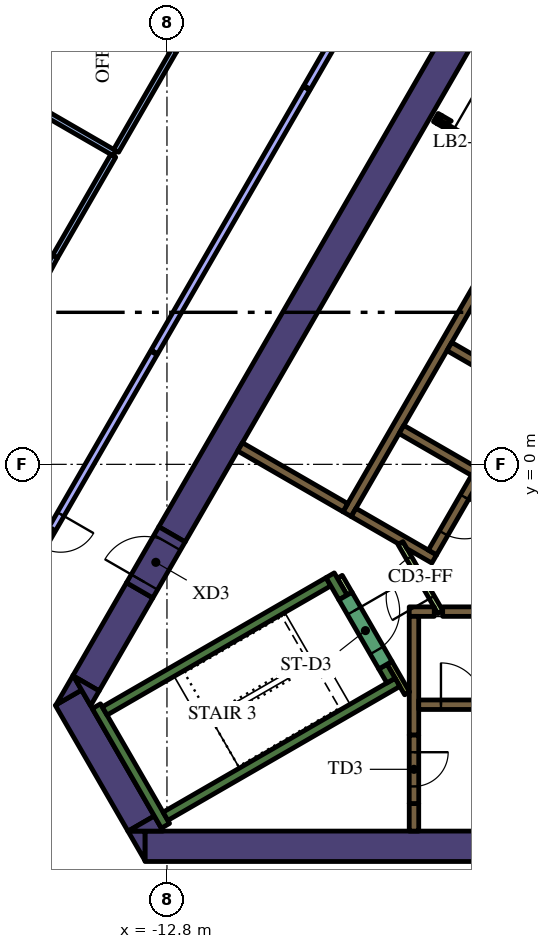
"""IFC4 building model, lengths in metres.
Left out: names, types, materials, properties, quantities, classifications, styles, units other than length and angle.
Written with IfcOpenShell. Run it as: python <this file> out.ifc"""

import sys

from ifc_helpers import new_model, si_unit, direction, frame, frame_2d, origin, place, context, subcontext, project, spatial, polyline, rectangle, outline, extrude, element, fill, save


model = new_model("IFC4")
c1 = context("Model", 3, precision=1e-05, world=origin(), true_north=direction((0.0, 1.0)))
c2 = subcontext(c1, "Body", "Model", "MODEL_VIEW")
j1 = project(units=[si_unit("LENGTHUNIT", "METRE"), si_unit("PLANEANGLEUNIT", "RADIAN")], contexts=[c1])
p1 = place(None, origin())
s1 = spatial("IfcSite", under=j1, at=p1, CompositionType="ELEMENT")
p2 = place(p1, origin())
s2 = spatial("IfcBuilding", under=s1, at=p2, CompositionType="ELEMENT")
p3 = place(p2, frame((0.0, 0.0, 175.2)))
s3 = spatial("IfcBuildingStorey", under=s2, at=p3, CompositionType="ELEMENT", Elevation=175.2)
p4 = place(p3, frame((-13.378, -10.05, 0.0), z_axis=(0.0, 0.0, 1.0), x_axis=(1.0, 0.0, 0.0)))
e1 = element("IfcWall", 1, at=p4, inside=s3, PredefinedType="SOLIDWALL", context=c2, shape_type="SweptSolid", body=[
    extrude(rectangle(XDim=22.282, YDim=0.8, at=frame_2d((11.141, 0.0))), origin(), (0.0, 0.0, 1.0), 4.2),
])
p5 = place(p3, origin())
e2 = element("IfcWall", 2, at=p5, inside=s3, PredefinedType="SOLIDWALL", context=c2, shape_type="SweptSolid", body=[
    extrude(outline(polyline([(-13.828, -9.65), (-13.38, -9.65), (-13.38, -10.426), (-13.828, -9.65)])), origin(), (0.0, 0.0, 1.0), 4.2),
])
p6 = place(p3, frame((-15.392, -6.14, 0.0), z_axis=(0.0, 0.0, 1.0), x_axis=(0.499984020225, -0.866034629516, 0.0)))
e3 = element("IfcWall", 3, at=p6, inside=s3, PredefinedType="SOLIDWALL", context=c2, shape_type="SweptSolid", body=[
    extrude(rectangle(XDim=3.824, YDim=0.8, at=frame_2d((1.912, 0.0))), origin(), (0.0, 0.0, 1.0), 4.2),
])
e4 = element("IfcWall", 4, at=p5, inside=s3, PredefinedType="SOLIDWALL", context=c2, shape_type="SweptSolid", body=[
    extrude(outline(polyline([(-15.047, -5.938), (-15.719, -6.326), (-15.271, -5.55), (-15.047, -5.938)])), origin(), (0.0, 0.0, 1.0), 4.2),
])
e5 = element("IfcWall", 5, at=p5, inside=s3, PredefinedType="SOLIDWALL", context=c2, shape_type="SweptSolid", body=[
    extrude(outline(polyline([(-12.904, -9.65), (-13.82, -9.65), (-13.133, -9.253), (-12.904, -9.65)])), origin(), (0.0, 0.0, 1.0), 4.2),
])
p7 = place(p3, frame((-13.518, -3.314, 0.0), z_axis=(0.0, 0.0, 1.0), x_axis=(-0.499969377405, -0.866043083026, 0.0)))
e6 = element("IfcWall", 6, at=p7, inside=s3, PredefinedType="SOLIDWALL", context=c2, shape_type="SweptSolid", body=[
    extrude(rectangle(XDim=2.824, YDim=0.8, at=frame_2d((1.412, 0.0))), origin(), (0.0, 0.0, 1.0), 4.2),
])
e7 = element("IfcWall", 7, at=p5, inside=s3, PredefinedType="SOLIDWALL", context=c2, shape_type="SweptSolid", body=[
    extrude(outline(polyline([(-14.809, -6.35), (-15.257, -5.574), (-14.585, -5.962), (-14.809, -6.35)])), origin(), (0.0, 0.0, 1.0), 4.2),
])
p8 = place(p3, frame((-12.668, -1.842, 0.0), z_axis=(0.0, 0.0, 1.0), x_axis=(0.500003640647, 0.866023301845, 0.0)))
e8 = element("IfcWall", 8, at=p8, inside=s3, PredefinedType="SOLIDWALL", context=c2, shape_type="SweptSolid", body=[
    extrude(rectangle(XDim=15.858, YDim=0.8, at=frame_2d((7.929, 0.0))), origin(), (0.0, 0.0, 1.0), 4.2),
])
p9 = place(p3, frame((-12.84, -9.511, 0.0), z_axis=(0.0, 0.0, 1.0), x_axis=(-0.499997733992, 0.866026712061, 0.0)))
e9 = element("IfcWall", 9, at=p9, inside=s3, PredefinedType="SOLIDWALL", context=c2, shape_type="SweptSolid", body=[
    extrude(rectangle(XDim=3.634, YDim=0.25, at=frame_2d((1.817, 0.0))), origin(), (0.0, 0.0, 1.0), 4.2),
])
p10 = place(p3, frame((-14.44, -6.49, 0.0), z_axis=(0.0, 0.0, 1.0), x_axis=(0.866022966069, 0.500004222222, 0.0)))
e10 = element("IfcWall", 10, at=p10, inside=s3, PredefinedType="SOLIDWALL", context=c2, shape_type="SweptSolid", body=[
    extrude(rectangle(XDim=6.8, YDim=0.25, at=frame_2d((3.4, 0.0))), origin(), (0.0, 0.0, 1.0), 4.2),
])
p11 = place(p3, frame((-8.168, -3.503, 0.0), z_axis=(0.0, 0.0, 1.0), x_axis=(-0.499952099219, 0.866053057547, 0.0)))
e11 = element("IfcWall", 11, at=p11, inside=s3, PredefinedType="SOLIDWALL", context=c2, shape_type="SweptSolid", body=[
    extrude(rectangle(XDim=0.675, YDim=0.25, at=frame_2d((0.337, 0.0))), origin(), (0.0, 0.0, 1.0), 4.2),
])
p12 = place(p3, frame((-12.84, -9.261, 0.0), z_axis=(0.0, 0.0, 1.0), x_axis=(0.866016039709, 0.500016218704, 0.0)))
e12 = element("IfcWall", 12, at=p12, inside=s3, PredefinedType="SOLIDWALL", context=c2, shape_type="SweptSolid", body=[
    extrude(rectangle(XDim=7.05, YDim=0.25, at=frame_2d((3.525, 0.0))), origin(), (0.0, 0.0, 1.0), 4.2),
])
p13 = place(p3, frame((-6.905, -5.69, 0.0), z_axis=(0.0, 0.0, 1.0), x_axis=(-0.500402024738, 0.865793170242, 0.0)))
e13 = element("IfcWall", 13, at=p13, inside=s3, PredefinedType="SOLIDWALL", context=c2, shape_type="SweptSolid", body=[
    extrude(rectangle(XDim=0.425, YDim=0.25, at=frame_2d((0.212, 0.0))), origin(), (0.0, 0.0, 1.0), 4.2),
])
p14 = place(p3, frame((-6.3, -8.925, 0.0), z_axis=(0.0, 0.0, 1.0), x_axis=(0.0, -1.0, 0.0)))
e14 = element("IfcWall", 14, at=p14, inside=s3, PredefinedType="SOLIDWALL", context=c2, shape_type="SweptSolid", body=[
    extrude(rectangle(XDim=0.725, YDim=0.25, at=frame_2d((0.363, 0.0))), origin(), (0.0, 0.0, 1.0), 4.2),
])
p15 = place(p3, frame((-5.545, -3.875, 0.0), z_axis=(0.0, 0.0, 1.0), x_axis=(1.0, 0.0, 0.0)))
e15 = element("IfcWall", 15, at=p15, inside=s3, PredefinedType="SOLIDWALL", context=c2, shape_type="SweptSolid", body=[
    extrude(rectangle(XDim=11.97, YDim=0.25, at=frame_2d((5.985, 0.0))), origin(), (0.0, 0.0, 1.0), 4.2),
])
p16 = place(p3, frame((-6.425, -3.875, 0.0), z_axis=(0.0, 0.0, 1.0), x_axis=(1.0, 0.0, 0.0)))
e16 = element("IfcWall", 16, at=p16, inside=s3, PredefinedType="SOLIDWALL", context=c2, shape_type="SweptSolid", body=[
    extrude(rectangle(XDim=0.658, YDim=0.25, at=frame_2d((0.329, 0.0))), origin(), (0.0, 0.0, 1.0), 4.2),
])
p17 = place(p3, frame((-6.3, -7.125, 0.0), z_axis=(0.0, 0.0, 1.0), x_axis=(0.0, 1.0, 0.0)))
e17 = element("IfcWall", 17, at=p17, inside=s3, PredefinedType="SOLIDWALL", context=c2, shape_type="SweptSolid", body=[
    extrude(rectangle(XDim=3.125, YDim=0.25, at=frame_2d((1.562, 0.0))), origin(), (0.0, 0.0, 1.0), 4.2),
])
p18 = place(p3, frame((-8.06, -1.311, 0.0), z_axis=(0.0, 0.0, 1.0), x_axis=(0.50000273126, 0.866023826885, 0.0)))
e18 = element("IfcWall", 18, at=p18, inside=s3, PredefinedType="SOLIDWALL", context=c2, shape_type="SweptSolid", body=[
    extrude(rectangle(XDim=10.33, YDim=0.25, at=frame_2d((5.165, 0.0))), origin(), (0.0, 0.0, 1.0), 4.2),
])
for number, where, z_axis, x_axis in (
    (19, (-5.369, 3.1, 0.0), (0.0, 0.0, 1.0), (0.866, -0.5, 0.0)),
    (20, (-4.724, -0.182, 0.0), (0.0, 0.0, 1.0), (-0.866, 0.5, 0.0)),
):
    element("IfcWall", number, at=place(p3, frame(where, z_axis=z_axis, x_axis=x_axis)), inside=s3, PredefinedType="SOLIDWALL", context=c2, shape_type="SweptSolid", body=[
        extrude(rectangle(XDim=2.2, YDim=0.25, at=frame_2d((1.1, 0.0))), origin(), (0.0, 0.0, 1.0), 4.2),
    ])
e21 = element("IfcWall", 21, at=p5, inside=s3, PredefinedType="SOLIDWALL", context=c2, shape_type="SweptSolid", body=[
    extrude(outline(polyline([(-5.922, -2.257), (-5.922, -2.257), (-5.705, -2.382), (-5.83, -2.598), (-6.483, -2.221), (-6.591, -2.033), (-6.591, -2.033), (-6.7, -2.096), (-7.952, -1.373), (-7.827, -1.156), (-5.922, -2.257)])), origin(), (0.0, 0.0, 1.0), 4.2),
])
p19 = place(p3, frame((-8.106, -1.14, 0.0), z_axis=(0.0, 0.0, 1.0), x_axis=(-0.866008981251, 0.500028443584, 0.0)))
e22 = element("IfcWall", 22, at=p19, inside=s3, PredefinedType="SOLIDWALL", context=c2, shape_type="SweptSolid", body=[
    extrude(rectangle(XDim=3.2, YDim=0.25, at=frame_2d((1.6, 0.0))), origin(), (0.0, 0.0, 1.0), 4.2),
])
p20 = place(p3, frame((-5.725, 9.125, 0.0), z_axis=(0.0, 0.0, 1.0), x_axis=(0.866185586049, -0.49972245349, 0.0)))
e23 = element("IfcWall", 23, at=p20, inside=s3, PredefinedType="SOLIDWALL", context=c2, shape_type="SweptSolid", body=[
    extrude(rectangle(XDim=0.11, YDim=0.25, at=frame_2d((0.055, 0.0))), origin(), (0.0, 0.0, 1.0), 4.2),
])
e24 = element("IfcWall", 24, at=p5, inside=s3, PredefinedType="SOLIDWALL", context=c2, shape_type="SweptSolid", body=[
    extrude(outline(polyline([(-5.689, 8.96), (-5.69, 8.961), (-5.565, 9.177), (-5.319, 9.035), (-5.335, 9.026), (-5.351, 9.015), (-5.366, 9.002), (-5.379, 8.988), (-5.392, 8.972), (-5.402, 8.956), (-5.412, 8.939), (-5.629, 9.064), (-5.629, 9.064), (-5.689, 8.96)])), origin(), (0.0, 0.0, 1.0), 4.2),
])
p21 = place(p3, frame((-8.252, -2.958, 0.0), z_axis=(0.0, 0.0, 1.0), x_axis=(0.500174715838, -0.865924508047, 0.0)))
e25 = element("IfcWall", 25, at=p21, inside=s3, PredefinedType="PARTITIONING", context=c2, shape_type="SweptSolid", body=[
    extrude(rectangle(XDim=0.514, YDim=0.15, at=frame_2d((0.257, 0.0))), origin(), (0.0, 0.0, 1.0), 3.15),
])
p22 = place(p3, frame((-6.48, -6.027, 0.0), z_axis=(0.0, 0.0, 1.0), x_axis=(-0.499927229454, 0.866067413802, 0.0)))
e26 = element("IfcWall", 26, at=p22, inside=s3, PredefinedType="PARTITIONING", context=c2, shape_type="SweptSolid", body=[
    extrude(rectangle(XDim=0.929, YDim=0.15, at=frame_2d((0.464, 0.0))), origin(), (0.0, 0.0, 1.0), 4.2),
])
p23 = place(p3, frame((-6.175, -6.325, 0.0), z_axis=(0.0, 0.0, 1.0), x_axis=(1.0, 0.0, 0.0)))
e27 = element("IfcWall", 27, at=p23, inside=s3, PredefinedType="SOLIDWALL", context=c2, shape_type="SweptSolid", body=[
    extrude(rectangle(XDim=12.35, YDim=0.25, at=frame_2d((6.175, 0.0))), origin(), (0.0, 0.0, 1.0), 4.2),
])
p24 = place(p23, frame((0.585, 0.0, 0.0)))
e28 = element("IfcOpeningElement", 28, at=p24, cuts=e27, PredefinedType="OPENING", context=c2, shape_type="SweptSolid", body=[
    extrude(rectangle(XDim=1.1, YDim=2.1, at=frame_2d((0.55, 1.05))), frame((0.0, 0.135, 0.0), z_axis=(0.0, -1.0, 0.0), x_axis=(1.0, 0.0, 0.0)), (0.0, 0.0, 1.0), 0.27),
])
p25 = place(p23, frame((3.105, 0.0, 0.0)))
e29 = element("IfcOpeningElement", 29, at=p25, cuts=e27, PredefinedType="OPENING", context=c2, shape_type="SweptSolid", body=[
    extrude(rectangle(XDim=1.1, YDim=2.1, at=frame_2d((0.55, 1.05))), frame((0.0, 0.135, 0.0), z_axis=(0.0, -1.0, 0.0), x_axis=(1.0, 0.0, 0.0)), (0.0, 0.0, 1.0), 0.27),
])
p26 = place(p23, frame((5.625, 0.0, 0.0)))
e30 = element("IfcOpeningElement", 30, at=p26, cuts=e27, PredefinedType="OPENING", context=c2, shape_type="SweptSolid", body=[
    extrude(rectangle(XDim=1.1, YDim=2.1, at=frame_2d((0.55, 1.05))), frame((0.0, 0.135, 0.0), z_axis=(0.0, -1.0, 0.0), x_axis=(1.0, 0.0, 0.0)), (0.0, 0.0, 1.0), 0.27),
])
p27 = place(p23, frame((8.145, 0.0, 0.0)))
e31 = element("IfcOpeningElement", 31, at=p27, cuts=e27, PredefinedType="OPENING", context=c2, shape_type="SweptSolid", body=[
    extrude(rectangle(XDim=1.1, YDim=2.1, at=frame_2d((0.55, 1.05))), frame((0.0, 0.135, 0.0), z_axis=(0.0, -1.0, 0.0), x_axis=(1.0, 0.0, 0.0)), (0.0, 0.0, 1.0), 0.27),
])
p28 = place(p23, frame((10.665, 0.0, 0.0)))
e32 = element("IfcOpeningElement", 32, at=p28, cuts=e27, PredefinedType="OPENING", context=c2, shape_type="SweptSolid", body=[
    extrude(rectangle(XDim=1.1, YDim=2.1, at=frame_2d((0.55, 1.05))), frame((0.0, 0.135, 0.0), z_axis=(0.0, -1.0, 0.0), x_axis=(1.0, 0.0, 0.0)), (0.0, 0.0, 1.0), 0.27),
])
p29 = place(p3, frame((-0.898, 6.194, 0.0), z_axis=(0.0, 0.0, 1.0), x_axis=(-0.499996202215, -0.866027596426, 0.0)))
e33 = element("IfcWall", 33, at=p29, inside=s3, PredefinedType="SOLIDWALL", context=c2, shape_type="SweptSolid", body=[
    extrude(rectangle(XDim=9.83, YDim=0.25, at=frame_2d((4.915, 0.0))), origin(), (0.0, 0.0, 1.0), 4.2),
])
p30 = place(p29, frame((0.585, 0.0, 0.0)))
e34 = element("IfcOpeningElement", 34, at=p30, cuts=e33, PredefinedType="OPENING", context=c2, shape_type="SweptSolid", body=[
    extrude(rectangle(XDim=1.1, YDim=2.1, at=frame_2d((0.55, 1.05))), frame((0.0, 0.135, 0.0), z_axis=(0.0, -1.0, 0.0), x_axis=(1.0, 0.0, 0.0)), (0.0, 0.0, 1.0), 0.27),
])
p31 = place(p29, frame((3.105, 0.0, 0.0)))
e35 = element("IfcOpeningElement", 35, at=p31, cuts=e33, PredefinedType="OPENING", context=c2, shape_type="SweptSolid", body=[
    extrude(rectangle(XDim=1.1, YDim=2.1, at=frame_2d((0.55, 1.05))), frame((0.0, 0.135, 0.0), z_axis=(0.0, -1.0, 0.0), x_axis=(1.0, 0.0, 0.0)), (0.0, 0.0, 1.0), 0.27),
])
p32 = place(p29, frame((5.625, 0.0, 0.0)))
e36 = element("IfcOpeningElement", 36, at=p32, cuts=e33, PredefinedType="OPENING", context=c2, shape_type="SweptSolid", body=[
    extrude(rectangle(XDim=1.1, YDim=2.1, at=frame_2d((0.55, 1.05))), frame((0.0, 0.135, 0.0), z_axis=(0.0, -1.0, 0.0), x_axis=(1.0, 0.0, 0.0)), (0.0, 0.0, 1.0), 0.27),
])
p33 = place(p29, frame((8.145, 0.0, 0.0)))
e37 = element("IfcOpeningElement", 37, at=p33, cuts=e33, PredefinedType="OPENING", context=c2, shape_type="SweptSolid", body=[
    extrude(rectangle(XDim=1.1, YDim=2.1, at=frame_2d((0.55, 1.05))), frame((0.0, 0.135, 0.0), z_axis=(0.0, -1.0, 0.0), x_axis=(1.0, 0.0, 0.0)), (0.0, 0.0, 1.0), 0.27),
])
p34 = place(p3, frame((-8.103, -3.466, 0.0), z_axis=(0.0, 0.0, 1.0), x_axis=(0.500078061341, -0.865980330357, 0.0)))
e38 = element("IfcWall", 38, at=p34, inside=s3, PredefinedType="SOLIDWALL", context=c2, shape_type="SweptSolid", body=[
    extrude(rectangle(XDim=2.1, YDim=0.4, at=frame_2d((1.05, 0.0))), origin(), (0.0, 0.0, 1.0), 4.2),
])
p35 = place(p34, frame((0.45, 0.0, 0.0)))
e39 = element("IfcOpeningElement", 39, at=p35, cuts=e38, PredefinedType="OPENING", context=c2, shape_type="SweptSolid", body=[
    extrude(rectangle(XDim=1.2, YDim=2.1, at=frame_2d((0.6, 1.05))), frame((0.0, 0.21, 0.0), z_axis=(0.0, -1.0, 0.0), x_axis=(1.0, 0.0, 0.0)), (0.0, 0.0, 1.0), 0.42),
])
p36 = place(p3, frame((-6.3, -7.125, 0.0), z_axis=(0.0, 0.0, 1.0), x_axis=(0.0, -1.0, 0.0)))
e40 = element("IfcWall", 40, at=p36, inside=s3, PredefinedType="SOLIDWALL", context=c2, shape_type="SweptSolid", body=[
    extrude(rectangle(XDim=1.8, YDim=0.25, at=frame_2d((0.9, 0.0))), origin(), (0.0, 0.0, 1.0), 4.2),
])
p37 = place(p36, frame((0.45, 0.0, 0.0)))
e41 = element("IfcOpeningElement", 41, at=p37, cuts=e40, PredefinedType="OPENING", context=c2, shape_type="SweptSolid", body=[
    extrude(rectangle(XDim=0.9, YDim=2.1, at=frame_2d((0.45, 1.05))), frame((0.0, 0.135, 0.0), z_axis=(0.0, -1.0, 0.0), x_axis=(1.0, 0.0, 0.0)), (0.0, 0.0, 1.0), 0.27),
])
p38 = place(p3, frame((-5.606, -3.89, 0.0), z_axis=(0.0, 0.0, 1.0), x_axis=(-0.500027713859, 0.866009402589, 0.0)))
e42 = element("IfcWall", 42, at=p38, inside=s3, PredefinedType="PARTITIONING", context=c2, shape_type="SweptSolid", body=[
    extrude(rectangle(XDim=2.1, YDim=0.15, at=frame_2d((1.05, 0.0))), origin(), (0.0, 0.0, 1.0), 3.15),
])
p39 = place(p38, frame((0.45, 0.0, 0.0)))
e43 = element("IfcOpeningElement", 43, at=p39, cuts=e42, PredefinedType="OPENING", context=c2, shape_type="SweptSolid", body=[
    extrude(rectangle(XDim=1.2, YDim=2.1, at=frame_2d((0.6, 1.05))), frame((0.0, 0.085, 0.0), z_axis=(0.0, -1.0, 0.0), x_axis=(1.0, 0.0, 0.0)), (0.0, 0.0, 1.0), 0.17),
])
p40 = place(p3, frame((-5.659, 9.012, 0.0), z_axis=(0.0, 0.0, 1.0), x_axis=(0.866009402589, -0.500027713859, 0.0)))
e44 = element("IfcWall", 44, at=p40, inside=s3, PredefinedType="PARTITIONING", context=c2, shape_type="SweptSolid", body=[
    extrude(rectangle(XDim=2.1, YDim=0.12, at=frame_2d((1.05, 0.0))), origin(), (0.0, 0.0, 1.0), 3.15),
])
p41 = place(p40, frame((0.45, 0.0, 0.0)))
e45 = element("IfcOpeningElement", 45, at=p41, cuts=e44, PredefinedType="OPENING", context=c2, shape_type="SweptSolid", body=[
    extrude(rectangle(XDim=1.2, YDim=2.1, at=frame_2d((0.6, 1.05))), frame((0.0, 0.07, 0.0), z_axis=(0.0, -1.0, 0.0), x_axis=(1.0, 0.0, 0.0)), (0.0, 0.0, 1.0), 0.14),
])
p42 = place(p3, frame((-13.518, -3.314, 0.0), z_axis=(0.0, 0.0, 1.0), x_axis=(0.500000056704, 0.866025371046, 0.0)))
e46 = element("IfcWall", 46, at=p42, inside=s3, PredefinedType="SOLIDWALL", context=c2, shape_type="SweptSolid", body=[
    extrude(rectangle(XDim=1.7, YDim=0.8, at=frame_2d((0.85, 0.0))), origin(), (0.0, 0.0, 1.0), 4.2),
])
p43 = place(p42, frame((0.25, 0.0, 0.0)))
e47 = element("IfcOpeningElement", 47, at=p43, cuts=e46, PredefinedType="OPENING", context=c2, shape_type="SweptSolid", body=[
    extrude(rectangle(XDim=1.2, YDim=2.1, at=frame_2d((0.6, 1.05))), frame((0.0, 0.41, 0.0), z_axis=(0.0, -1.0, 0.0), x_axis=(1.0, 0.0, 0.0)), (0.0, 0.0, 1.0), 0.82),
])
p44 = place(p3, frame((-14.175, 8.184, 0.0), z_axis=(0.0, 0.0, 1.0), x_axis=(-0.866032203192, 0.499988222896, 0.0)))
e48 = element("IfcWall", 48, at=p44, inside=s3, PredefinedType="PARTITIONING", context=c2, shape_type="SweptSolid", body=[
    extrude(rectangle(XDim=4.4, YDim=0.15, at=frame_2d((2.2, 0.0))), origin(), (0.0, 0.0, 1.0), 3.15),
])
for number, where, z_axis, x_axis in (
    (49, (-12.608, 10.899, 0.0), (0.0, 0.0, 1.0), (-0.5, -0.866, 0.0)),
    (50, (-14.213, 8.119, 0.0), (0.0, 0.0, 1.0), (-0.5, -0.866, 0.0)),
):
    element("IfcWall", number, at=place(p3, frame(where, z_axis=z_axis, x_axis=x_axis)), inside=s3, PredefinedType="PARTITIONING", context=c2, shape_type="SweptSolid", body=[
        extrude(rectangle(XDim=3.06, YDim=0.15, at=frame_2d((1.53, 0.0))), origin(), (0.0, 0.0, 1.0), 3.15),
    ])
p45 = place(p3, frame((-17.259, 2.647, 0.0), z_axis=(0.0, 0.0, 1.0), x_axis=(0.473299711777, 0.880901460341, 0.0)))
e51 = element("IfcWall", 51, at=p45, inside=s3, PredefinedType="PARTITIONING", context=c2, shape_type="SweptSolid", body=[
    extrude(rectangle(XDim=3.203, YDim=0.15, at=frame_2d((1.602, 0.0))), origin(), (0.0, 0.0, 1.0), 3.15),
])
p46 = place(p45, frame((1.104, 0.0, 0.0)))
e52 = element("IfcOpeningElement", 52, at=p46, cuts=e51, PredefinedType="OPENING", context=c2, shape_type="SweptSolid", body=[
    extrude(rectangle(XDim=0.9, YDim=2.1, at=frame_2d((0.45, 1.05))), frame((0.0, 0.085, 0.0), z_axis=(0.0, -1.0, 0.0), x_axis=(1.0, 0.0, 0.0)), (0.0, 0.0, 1.0), 0.17),
])
p47 = place(p3, frame((-9.126, 9.893, 0.0), z_axis=(0.0, 0.0, 1.0), x_axis=(-0.499995158272, -0.866028199139, 0.0)))
e53 = element("IfcWall", 53, at=p47, inside=s3, PredefinedType="PARTITIONING", context=c2, shape_type="SweptSolid", body=[
    extrude(rectangle(XDim=8.008, YDim=0.2, at=frame_2d((4.004, 0.0))), origin(), (0.0, 0.0, 1.0), 3.15),
])
p48 = place(p3, frame((-13.146, 2.931, 0.0), z_axis=(0.0, 0.0, 1.0), x_axis=(-0.499997861235, -0.866026638597, 0.0)))
e54 = element("IfcWall", 54, at=p48, inside=s3, PredefinedType="PARTITIONING", context=c2, shape_type="SweptSolid", body=[
    extrude(rectangle(XDim=10.717, YDim=0.2, at=frame_2d((5.359, 0.0))), origin(), (0.0, 0.0, 1.0), 3.15),
])
p49 = place(p48, frame((4.9, 0.0, 0.0)))
e55 = element("IfcOpeningElement", 55, at=p49, cuts=e54, PredefinedType="OPENING", context=c2, shape_type="SweptSolid", body=[
    extrude(rectangle(XDim=1.0, YDim=2.1, at=frame_2d((0.5, 1.05))), frame((0.0, 0.11, 0.0), z_axis=(0.0, -1.0, 0.0), x_axis=(1.0, 0.0, 0.0)), (0.0, 0.0, 1.0), 0.22),
])
p50 = place(p3, frame((-18.489, -6.376, 0.0), z_axis=(0.0, 0.0, 1.0), x_axis=(0.499989401968, -0.866031522475, 0.0)))
e56 = element("IfcWall", 56, at=p50, inside=s3, PredefinedType="PARTITIONING", context=c2, shape_type="SweptSolid", body=[
    extrude(rectangle(XDim=6.677, YDim=0.2, at=frame_2d((3.338, 0.0))), origin(), (0.0, 0.0, 1.0), 3.15),
])
p51 = place(p3, frame((-4.757, 17.461, 0.0), z_axis=(0.0, 0.0, 1.0), x_axis=(-0.499998278779, -0.866026397529, 0.0)))
e57 = element("IfcWall", 57, at=p51, inside=s3, PredefinedType="PARTITIONING", context=c2, shape_type="SweptSolid", body=[
    extrude(rectangle(XDim=8.709, YDim=0.2, at=frame_2d((4.354, 0.0))), origin(), (0.0, 0.0, 1.0), 3.15),
])
p52 = place(p24, origin())
e58 = element("IfcDoor", 58, at=p52, inside=s3, OperationType="DOUBLE_DOOR_SLIDING", PredefinedType="DOOR", context=c2, shape_type="SweptSolid", body=[
    extrude(rectangle(XDim=1.1, YDim=2.1, at=frame_2d((0.55, 1.05))), frame((0.0, 0.025, 0.0), z_axis=(0.0, -1.0, 0.0), x_axis=(1.0, 0.0, 0.0)), (0.0, 0.0, 1.0), 0.05),
])
fill(e28, e58)
p53 = place(p33, origin())
e59 = element("IfcDoor", 59, at=p53, inside=s3, OperationType="DOUBLE_DOOR_SLIDING", PredefinedType="DOOR", context=c2, shape_type="SweptSolid", body=[
    extrude(rectangle(XDim=1.1, YDim=2.1, at=frame_2d((0.55, 1.05))), frame((0.0, 0.025, 0.0), z_axis=(0.0, -1.0, 0.0), x_axis=(1.0, 0.0, 0.0)), (0.0, 0.0, 1.0), 0.05),
])
fill(e37, e59)
p54 = place(p35, origin())
e60 = element("IfcDoor", 60, at=p54, inside=s3, OperationType="SINGLE_SWING_LEFT", PredefinedType="DOOR", context=c2, shape_type="SweptSolid", body=[
    extrude(rectangle(XDim=1.2, YDim=2.1, at=frame_2d((0.6, 1.05))), frame((0.0, 0.025, 0.0), z_axis=(0.0, -1.0, 0.0), x_axis=(1.0, 0.0, 0.0)), (0.0, 0.0, 1.0), 0.05),
])
fill(e39, e60)
p55 = place(p37, origin())
e61 = element("IfcDoor", 61, at=p55, inside=s3, OperationType="SINGLE_SWING_LEFT", PredefinedType="DOOR", context=c2, shape_type="SweptSolid", body=[
    extrude(rectangle(XDim=0.9, YDim=2.1, at=frame_2d((0.45, 1.05))), frame((0.0, 0.025, 0.0), z_axis=(0.0, -1.0, 0.0), x_axis=(1.0, 0.0, 0.0)), (0.0, 0.0, 1.0), 0.05),
])
fill(e41, e61)
p56 = place(p39, origin())
e62 = element("IfcDoor", 62, at=p56, inside=s3, OperationType="SINGLE_SWING_LEFT", PredefinedType="DOOR", context=c2, shape_type="SweptSolid", body=[
    extrude(rectangle(XDim=1.2, YDim=2.1, at=frame_2d((0.6, 1.05))), frame((0.0, 0.025, 0.0), z_axis=(0.0, -1.0, 0.0), x_axis=(1.0, 0.0, 0.0)), (0.0, 0.0, 1.0), 0.05),
])
fill(e43, e62)
p57 = place(p41, origin())
e63 = element("IfcDoor", 63, at=p57, inside=s3, OperationType="SINGLE_SWING_LEFT", PredefinedType="DOOR", context=c2, shape_type="SweptSolid", body=[
    extrude(rectangle(XDim=1.2, YDim=2.1, at=frame_2d((0.6, 1.05))), frame((0.0, 0.025, 0.0), z_axis=(0.0, -1.0, 0.0), x_axis=(1.0, 0.0, 0.0)), (0.0, 0.0, 1.0), 0.05),
])
fill(e45, e63)
p58 = place(p43, origin())
e64 = element("IfcDoor", 64, at=p58, inside=s3, OperationType="SINGLE_SWING_LEFT", PredefinedType="DOOR", context=c2, shape_type="SweptSolid", body=[
    extrude(rectangle(XDim=1.2, YDim=2.1, at=frame_2d((0.6, 1.05))), frame((0.0, 0.025, 0.0), z_axis=(0.0, -1.0, 0.0), x_axis=(1.0, 0.0, 0.0)), (0.0, 0.0, 1.0), 0.05),
])
fill(e47, e64)
p59 = place(p49, origin())
e65 = element("IfcDoor", 65, at=p59, inside=s3, OperationType="SINGLE_SWING_RIGHT", PredefinedType="DOOR", context=c2, shape_type="SweptSolid", body=[
    extrude(rectangle(XDim=1.0, YDim=2.1, at=frame_2d((0.5, 1.05))), frame((0.0, 0.025, 0.0), z_axis=(0.0, -1.0, 0.0), x_axis=(1.0, 0.0, 0.0)), (0.0, 0.0, 1.0), 0.05),
])
fill(e55, e65)
save(model, sys.argv[1])
